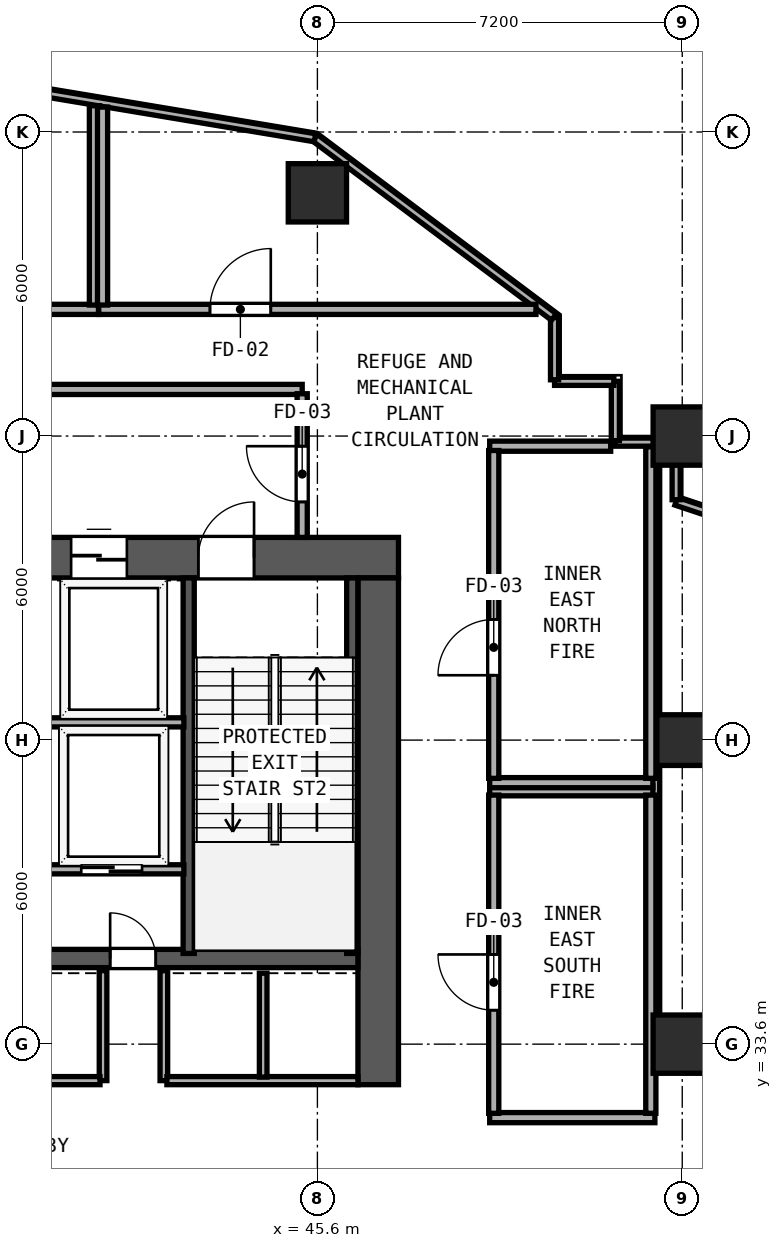
"""IFC4 building model, lengths in metres.
Left out: names, types, materials, properties, quantities, classifications, styles, units other than length and angle.
Written with IfcOpenShell. Run it as: python <this file> out.ifc"""

import sys

from ifc_helpers import new_model, si_unit, direction, frame, frame_2d, origin, origin_2d, place, context, subcontext, project, spatial, rectangle, hollow_rectangle, extrude, element, fill, save


model = new_model("IFC4")
c1 = context("Model", 3, precision=1e-05, world=origin(), true_north=direction((0.0, 1.0)))
c2 = subcontext(c1, "Body", "Model", "MODEL_VIEW")
j1 = project(units=[si_unit("LENGTHUNIT", "METRE"), si_unit("PLANEANGLEUNIT", "RADIAN")], contexts=[c1])
p1 = place(None, origin())
s1 = spatial("IfcSite", under=j1, at=p1, CompositionType="ELEMENT")
p2 = place(p1, origin())
s2 = spatial("IfcBuilding", under=s1, at=p2, CompositionType="ELEMENT")
p3 = place(p2, frame((0.0, 0.0, 89.4)))
s3 = spatial("IfcBuildingStorey", under=s2, at=p3, CompositionType="ELEMENT", Elevation=89.4)
p4 = place(p3, frame((29.6, 43.2, 0.0), z_axis=(0.0, 0.0, 1.0), x_axis=(1.0, 0.0, 0.0)))
e1 = element("IfcWall", 1, at=p4, inside=s3, PredefinedType="SHEAR", context=c2, shape_type="SweptSolid", body=[
    extrude(rectangle(XDim=17.6, YDim=0.8, at=frame_2d((8.8, 0.0))), origin(), (0.0, 0.0, 1.0), 4.35),
])
p5 = place(p4, frame((2.45, 0.0, 0.0)))
e2 = element("IfcOpeningElement", 2, at=p5, cuts=e1, PredefinedType="OPENING", context=c2, shape_type="SweptSolid", body=[
    extrude(rectangle(XDim=1.1, YDim=2.15, at=frame_2d((0.55, 1.075))), frame((0.0, 0.41, 0.0), z_axis=(0.0, -1.0, 0.0), x_axis=(1.0, 0.0, 0.0)), (0.0, 0.0, 1.0), 0.82),
])
p6 = place(p4, frame((7.56, 0.0, 0.0)))
e3 = element("IfcOpeningElement", 3, at=p6, cuts=e1, PredefinedType="OPENING", context=c2, shape_type="SweptSolid", body=[
    extrude(rectangle(XDim=1.1, YDim=2.15, at=frame_2d((0.55, 1.075))), frame((0.0, 0.41, 0.0), z_axis=(0.0, -1.0, 0.0), x_axis=(1.0, 0.0, 0.0)), (0.0, 0.0, 1.0), 0.82),
])
p7 = place(p4, frame((13.65, 0.0, 0.0)))
e4 = element("IfcOpeningElement", 4, at=p7, cuts=e1, PredefinedType="OPENING", context=c2, shape_type="SweptSolid", body=[
    extrude(rectangle(XDim=1.1, YDim=2.15, at=frame_2d((0.55, 1.075))), frame((0.0, 0.41, 0.0), z_axis=(0.0, -1.0, 0.0), x_axis=(1.0, 0.0, 0.0)), (0.0, 0.0, 1.0), 0.82),
])
p8 = place(p4, frame((4.78, 0.0, 0.0)))
e5 = element("IfcOpeningElement", 5, at=p8, cuts=e1, PredefinedType="OPENING", context=c2, shape_type="SweptSolid", body=[
    extrude(rectangle(XDim=1.1, YDim=2.2, at=frame_2d((0.55, 1.1))), frame((0.0, 0.41, 0.0), z_axis=(0.0, -1.0, 0.0), x_axis=(1.0, 0.0, 0.0)), (0.0, 0.0, 1.0), 0.82),
])
p9 = place(p4, frame((11.14, 0.0, 0.0)))
e6 = element("IfcOpeningElement", 6, at=p9, cuts=e1, PredefinedType="OPENING", context=c2, shape_type="SweptSolid", body=[
    extrude(rectangle(XDim=1.1, YDim=2.2, at=frame_2d((0.55, 1.1))), frame((0.0, 0.41, 0.0), z_axis=(0.0, -1.0, 0.0), x_axis=(1.0, 0.0, 0.0)), (0.0, 0.0, 1.0), 0.82),
])
p10 = place(p3, frame((46.8, 32.8, 0.0), z_axis=(0.0, 0.0, 1.0), x_axis=(0.0, 1.0, 0.0)))
e7 = element("IfcWall", 7, at=p10, inside=s3, PredefinedType="SHEAR", context=c2, shape_type="SweptSolid", body=[
    extrude(rectangle(XDim=10.0, YDim=0.8, at=frame_2d((5.0, 0.0))), origin(), (0.0, 0.0, 1.0), 4.35),
])
p11 = place(p3, frame((30.4, 35.29, 0.0), z_axis=(0.0, 0.0, 1.0), x_axis=(1.0, 0.0, 0.0)))
e8 = element("IfcWall", 8, at=p11, inside=s3, PredefinedType="SHEAR", context=c2, shape_type="SweptSolid", body=[
    extrude(rectangle(XDim=16.0, YDim=0.36, at=frame_2d((8.0, 0.0))), origin(), (0.0, 0.0, 1.0), 4.35),
])
p12 = place(p11, frame((4.95, 0.0, 0.0), z_axis=(0.0, 0.0, 1.0), x_axis=(-1.0, 0.0, 0.0)))
e9 = element("IfcOpeningElement", 9, at=p12, cuts=e8, PredefinedType="OPENING", context=c2, shape_type="SweptSolid", body=[
    extrude(rectangle(XDim=0.9, YDim=2.1, at=frame_2d((0.45, 1.05))), frame((0.0, 0.19, 0.0), z_axis=(0.0, -1.0, 0.0), x_axis=(1.0, 0.0, 0.0)), (0.0, 0.0, 1.0), 0.38),
])
p13 = place(p11, frame((12.01, 0.0, 0.0), z_axis=(0.0, 0.0, 1.0), x_axis=(-1.0, 0.0, 0.0)))
e10 = element("IfcOpeningElement", 10, at=p13, cuts=e8, PredefinedType="OPENING", context=c2, shape_type="SweptSolid", body=[
    extrude(rectangle(XDim=0.9, YDim=2.1, at=frame_2d((0.45, 1.05))), frame((0.0, 0.19, 0.0), z_axis=(0.0, -1.0, 0.0), x_axis=(1.0, 0.0, 0.0)), (0.0, 0.0, 1.0), 0.38),
])
for number, where, z_axis, x_axis in (
    (11, (43.06, 35.39, 0.0), (0.0, 0.0, 1.0), (0.0, 1.0, 0.0)),
    (12, (46.288, 35.39, 0.0), (0.0, 0.0, 1.0), (0.0, 1.0, 0.0)),
):
    element("IfcWall", number, at=place(p3, frame(where, z_axis=z_axis, x_axis=x_axis)), inside=s3, PredefinedType="SHEAR", context=c2, shape_type="SweptSolid", body=[
        extrude(rectangle(XDim=7.41, YDim=0.22, at=frame_2d((3.705, 0.0))), origin(), (0.0, 0.0, 1.0), 4.35),
    ])
for number, where, z_axis, x_axis in (
    (13, (52.8, 33.6, 0.0), (0.0, 0.0, 1.0), (1.0, 0.0, 0.0)),
    (14, (52.8, 45.6, 0.0), (0.0, 0.0, 1.0), (1.0, 0.0, 0.0)),
    (15, (45.6, 50.4, 0.0), (0.0, 0.0, 1.0), (1.0, 0.0, 0.0)),
):
    element("IfcColumn", number, at=place(p3, frame(where, z_axis=z_axis, x_axis=x_axis)), inside=s3, PredefinedType="COLUMN", context=c2, shape_type="SweptSolid", body=[
        extrude(hollow_rectangle(XDim=1.15, YDim=1.15, WallThickness=0.042, at=origin_2d()), origin(), (0.0, 0.0, 1.0), 4.6),
    ])
p14 = place(p3, frame((52.8, 39.6, 0.0), z_axis=(0.0, 0.0, 1.0), x_axis=(1.0, 0.0, 0.0)))
e16 = element("IfcColumn", 16, at=p14, inside=s3, PredefinedType="COLUMN", context=c2, shape_type="SweptSolid", body=[
    extrude(hollow_rectangle(XDim=1.0, YDim=1.0, WallThickness=0.038, at=origin_2d()), origin(), (0.0, 0.0, 1.0), 4.6),
])
p15 = place(p3, frame((58.145, 42.492, 0.0), z_axis=(0.0, 0.0, 1.0), x_axis=(-0.948683298051, 0.316227766017, 0.0)))
e17 = element("IfcWall", 17, at=p15, inside=s3, PredefinedType="PARAPET", context=c2, shape_type="SweptSolid", body=[
    extrude(rectangle(XDim=5.76, YDim=0.16, at=frame_2d((2.88, 0.0))), origin(), (0.0, 0.0, 1.0), 1.15),
])
p16 = place(p3, frame((52.68, 44.344, 0.0), z_axis=(0.0, 0.0, 1.0), x_axis=(0.0, 1.0, 0.0)))
e18 = element("IfcWall", 18, at=p16, inside=s3, PredefinedType="PARAPET", context=c2, shape_type="SweptSolid", body=[
    extrude(rectangle(XDim=0.689, YDim=0.16, at=frame_2d((0.345, 0.0))), origin(), (0.0, 0.0, 1.0), 1.15),
])
p17 = place(p3, frame((52.233, 45.48, 0.0), z_axis=(0.0, 0.0, 1.0), x_axis=(-1.0, 0.0, 0.0)))
e19 = element("IfcWall", 19, at=p17, inside=s3, PredefinedType="PARAPET", context=c2, shape_type="SweptSolid", body=[
    extrude(rectangle(XDim=0.753, YDim=0.16, at=frame_2d((0.376, 0.0))), origin(), (0.0, 0.0, 1.0), 1.15),
])
for number, where, z_axis, x_axis in (
    (20, (51.48, 45.51, 0.0), (0.0, 0.0, 1.0), (0.0, 1.0, 0.0)),
    (21, (51.45, 46.68, 0.0), (0.0, 0.0, 1.0), (-1.0, 0.0, 0.0)),
):
    element("IfcWall", number, at=place(p3, frame(where, z_axis=z_axis, x_axis=x_axis)), inside=s3, PredefinedType="PARAPET", context=c2, shape_type="SweptSolid", body=[
        extrude(rectangle(XDim=1.17, YDim=0.16, at=frame_2d((0.585, 0.0))), origin(), (0.0, 0.0, 1.0), 1.15),
    ])
p18 = place(p3, frame((50.28, 46.71, 0.0), z_axis=(0.0, 0.0, 1.0), x_axis=(0.0, 1.0, 0.0)))
e22 = element("IfcWall", 22, at=p18, inside=s3, PredefinedType="PARAPET", context=c2, shape_type="SweptSolid", body=[
    extrude(rectangle(XDim=1.23, YDim=0.16, at=frame_2d((0.615, 0.0))), origin(), (0.0, 0.0, 1.0), 1.15),
])
p19 = place(p3, frame((50.268, 47.949, 0.0), z_axis=(0.0, 0.0, 1.0), x_axis=(-0.800004969205, 0.599993374337, 0.0)))
e23 = element("IfcWall", 23, at=p19, inside=s3, PredefinedType="PARAPET", context=c2, shape_type="SweptSolid", body=[
    extrude(rectangle(XDim=5.896, YDim=0.16, at=frame_2d((2.948, 0.0))), origin(), (0.0, 0.0, 1.0), 1.15),
])
p20 = place(p3, frame((45.552, 51.486, 0.0), z_axis=(0.0, 0.0, 1.0), x_axis=(-0.986394833909, 0.164393526752, 0.0)))
e24 = element("IfcWall", 24, at=p20, inside=s3, PredefinedType="PARAPET", context=c2, shape_type="SweptSolid", body=[
    extrude(rectangle(XDim=7.25, YDim=0.16, at=frame_2d((3.625, 0.0))), origin(), (0.0, 0.0, 1.0), 1.15),
])
p21 = place(p3, frame((31.5, 46.52, 0.0), z_axis=(0.0, 0.0, 1.0), x_axis=(1.0, 0.0, 0.0)))
e25 = element("IfcWall", 25, at=p21, inside=s3, PredefinedType="SOLIDWALL", context=c2, shape_type="SweptSolid", body=[
    extrude(rectangle(XDim=13.8, YDim=0.2, at=frame_2d((6.9, 0.0))), origin(), (0.0, 0.0, 1.0), 4.35),
])
p22 = place(p3, frame((45.3, 43.6, 0.0), z_axis=(0.0, 0.0, 1.0), x_axis=(0.0, 1.0, 0.0)))
e26 = element("IfcWall", 26, at=p22, inside=s3, PredefinedType="SOLIDWALL", context=c2, shape_type="SweptSolid", body=[
    extrude(rectangle(XDim=2.835, YDim=0.2, at=frame_2d((1.417, 0.0))), origin(), (0.0, 0.0, 1.0), 4.35),
])
p23 = place(p22, frame((0.7, 0.0, 0.0)))
e27 = element("IfcOpeningElement", 27, at=p23, cuts=e26, PredefinedType="OPENING", context=c2, shape_type="SweptSolid", body=[
    extrude(rectangle(XDim=1.1, YDim=2.15, at=frame_2d((0.55, 1.075))), frame((0.0, 0.11, 0.0), z_axis=(0.0, -1.0, 0.0), x_axis=(1.0, 0.0, 0.0)), (0.0, 0.0, 1.0), 0.22),
])
p24 = place(p3, frame((40.195, 39.95, 0.0), z_axis=(0.0, 0.0, 1.0), x_axis=(1.0, 0.0, 0.0)))
e28 = element("IfcWall", 28, at=p24, inside=s3, PredefinedType="SOLIDWALL", context=c2, shape_type="SweptSolid", body=[
    extrude(rectangle(XDim=2.77, YDim=0.18, at=frame_2d((1.385, 0.0))), origin(), (0.0, 0.0, 1.0), 4.35),
])
p25 = place(p3, frame((40.195, 37.05, 0.0), z_axis=(0.0, 0.0, 1.0), x_axis=(1.0, 0.0, 0.0)))
e29 = element("IfcWall", 29, at=p25, inside=s3, PredefinedType="SOLIDWALL", context=c2, shape_type="SweptSolid", body=[
    extrude(rectangle(XDim=2.77, YDim=0.18, at=frame_2d((1.385, 0.0))), origin(), (0.0, 0.0, 1.0), 4.35),
])
p26 = place(p25, frame((1.945, 0.0, 0.0), z_axis=(0.0, 0.0, 1.0), x_axis=(-1.0, 0.0, 0.0)))
e30 = element("IfcOpeningElement", 30, at=p26, cuts=e29, PredefinedType="OPENING", context=c2, shape_type="SweptSolid", body=[
    extrude(rectangle(XDim=1.2, YDim=2.2, at=frame_2d((0.6, 1.1))), frame((0.0, 0.1, 0.0), z_axis=(0.0, -1.0, 0.0), x_axis=(1.0, 0.0, 0.0)), (0.0, 0.0, 1.0), 0.2),
])
for number, where, z_axis, x_axis in (
    (31, (41.37, 32.88, 0.0), (0.0, 0.0, 1.0), (0.0, 1.0, 0.0)),
    (32, (42.57, 32.88, 0.0), (0.0, 0.0, 1.0), (0.0, 1.0, 0.0)),
):
    element("IfcWall", number, at=place(p3, frame(where, z_axis=z_axis, x_axis=x_axis)), inside=s3, PredefinedType="SOLIDWALL", context=c2, shape_type="SweptSolid", body=[
        extrude(rectangle(XDim=2.17, YDim=0.15, at=frame_2d((1.085, 0.0))), origin(), (0.0, 0.0, 1.0), 4.35),
    ])
p27 = place(p3, frame((35.57, 32.88, 0.0), z_axis=(0.0, 0.0, 1.0), x_axis=(1.0, 0.0, 0.0)))
e33 = element("IfcWall", 33, at=p27, inside=s3, PredefinedType="SOLIDWALL", context=c2, shape_type="SweptSolid", body=[
    extrude(rectangle(XDim=5.74, YDim=0.16, at=frame_2d((2.87, 0.0))), origin(), (0.0, 0.0, 1.0), 4.35),
])
p28 = place(p27, frame((1.47, 0.0, 0.0), z_axis=(0.0, 0.0, 1.0), x_axis=(-1.0, 0.0, 0.0)))
e34 = element("IfcOpeningElement", 34, at=p28, cuts=e33, PredefinedType="OPENING", context=c2, shape_type="SweptSolid", body=[
    extrude(rectangle(XDim=1.1, YDim=2.2, at=frame_2d((0.55, 1.1))), frame((0.0, 0.09, 0.0), z_axis=(0.0, -1.0, 0.0), x_axis=(1.0, 0.0, 0.0)), (0.0, 0.0, 1.0), 0.18),
])
p29 = place(p27, frame((3.46, 0.0, 0.0), z_axis=(0.0, 0.0, 1.0), x_axis=(-1.0, 0.0, 0.0)))
e35 = element("IfcOpeningElement", 35, at=p29, cuts=e33, PredefinedType="OPENING", context=c2, shape_type="SweptSolid", body=[
    extrude(rectangle(XDim=1.1, YDim=2.2, at=frame_2d((0.55, 1.1))), frame((0.0, 0.09, 0.0), z_axis=(0.0, -1.0, 0.0), x_axis=(1.0, 0.0, 0.0)), (0.0, 0.0, 1.0), 0.18),
])
p30 = place(p3, frame((42.63, 32.88, 0.0), z_axis=(0.0, 0.0, 1.0), x_axis=(1.0, 0.0, 0.0)))
e36 = element("IfcWall", 36, at=p30, inside=s3, PredefinedType="SOLIDWALL", context=c2, shape_type="SweptSolid", body=[
    extrude(rectangle(XDim=3.77, YDim=0.16, at=frame_2d((1.885, 0.0))), origin(), (0.0, 0.0, 1.0), 4.35),
])
p31 = place(p3, frame((44.53, 32.95, 0.0), z_axis=(0.0, 0.0, 1.0), x_axis=(0.0, 1.0, 0.0)))
e37 = element("IfcWall", 37, at=p31, inside=s3, PredefinedType="SOLIDWALL", context=c2, shape_type="SweptSolid", body=[
    extrude(rectangle(XDim=2.05, YDim=0.15, at=frame_2d((1.025, 0.0))), origin(), (0.0, 0.0, 1.0), 4.35),
])
p32 = place(p3, frame((52.28, 33.6, 0.0), z_axis=(0.0, 0.0, 1.0), x_axis=(0.0, 1.0, 0.0)))
e38 = element("IfcWall", 38, at=p32, inside=s3, PredefinedType="PARTITIONING", context=c2, shape_type="SweptSolid", body=[
    extrude(rectangle(XDim=11.788, YDim=0.15, at=frame_2d((5.894, 0.0))), origin(), (0.0, 0.0, 1.0), 4.35),
])
p33 = place(p3, frame((49.0, 38.6, 0.0), z_axis=(0.0, 0.0, 1.0), x_axis=(1.0, 0.0, 0.0)))
e39 = element("IfcWall", 39, at=p33, inside=s3, PredefinedType="SOLIDWALL", context=c2, shape_type="SweptSolid", body=[
    extrude(rectangle(XDim=3.22, YDim=0.2, at=frame_2d((1.61, 0.0))), origin(), (0.0, 0.0, 1.0), 4.35),
])
p34 = place(p3, frame((49.0, 32.15, 0.0), z_axis=(0.0, 0.0, 1.0), x_axis=(1.0, 0.0, 0.0)))
e40 = element("IfcWall", 40, at=p34, inside=s3, PredefinedType="SOLIDWALL", context=c2, shape_type="SweptSolid", body=[
    extrude(rectangle(XDim=3.26, YDim=0.2, at=frame_2d((1.63, 0.0))), origin(), (0.0, 0.0, 1.0), 4.35),
])
p35 = place(p3, frame((49.08, 32.235, 0.0), z_axis=(0.0, 0.0, 1.0), x_axis=(0.0, 1.0, 0.0)))
e41 = element("IfcWall", 41, at=p35, inside=s3, PredefinedType="SOLIDWALL", context=c2, shape_type="SweptSolid", body=[
    extrude(rectangle(XDim=6.28, YDim=0.2, at=frame_2d((3.14, 0.0))), origin(), (0.0, 0.0, 1.0), 4.35),
])
p36 = place(p35, frame((2.035, 0.0, 0.0)))
e42 = element("IfcOpeningElement", 42, at=p36, cuts=e41, PredefinedType="OPENING", context=c2, shape_type="SweptSolid", body=[
    extrude(rectangle(XDim=1.1, YDim=2.15, at=frame_2d((0.55, 1.075))), frame((0.0, 0.11, 0.0), z_axis=(0.0, -1.0, 0.0), x_axis=(1.0, 0.0, 0.0)), (0.0, 0.0, 1.0), 0.22),
])
p37 = place(p3, frame((52.18, 32.235, 0.0), z_axis=(0.0, 0.0, 1.0), x_axis=(0.0, 1.0, 0.0)))
e43 = element("IfcWall", 43, at=p37, inside=s3, PredefinedType="SOLIDWALL", context=c2, shape_type="SweptSolid", body=[
    extrude(rectangle(XDim=6.28, YDim=0.2, at=frame_2d((3.14, 0.0))), origin(), (0.0, 0.0, 1.0), 4.35),
])
p38 = place(p3, frame((49.0, 45.4, 0.0), z_axis=(0.0, 0.0, 1.0), x_axis=(1.0, 0.0, 0.0)))
e44 = element("IfcWall", 44, at=p38, inside=s3, PredefinedType="SOLIDWALL", context=c2, shape_type="SweptSolid", body=[
    extrude(rectangle(XDim=2.388, YDim=0.2, at=frame_2d((1.194, 0.0))), origin(), (0.0, 0.0, 1.0), 4.35),
])
p39 = place(p3, frame((49.0, 38.76, 0.0), z_axis=(0.0, 0.0, 1.0), x_axis=(1.0, 0.0, 0.0)))
e45 = element("IfcWall", 45, at=p39, inside=s3, PredefinedType="SOLIDWALL", context=c2, shape_type="SweptSolid", body=[
    extrude(rectangle(XDim=3.22, YDim=0.2, at=frame_2d((1.61, 0.0))), origin(), (0.0, 0.0, 1.0), 4.35),
])
p40 = place(p3, frame((49.08, 38.845, 0.0), z_axis=(0.0, 0.0, 1.0), x_axis=(0.0, 1.0, 0.0)))
e46 = element("IfcWall", 46, at=p40, inside=s3, PredefinedType="SOLIDWALL", context=c2, shape_type="SweptSolid", body=[
    extrude(rectangle(XDim=6.47, YDim=0.2, at=frame_2d((3.235, 0.0))), origin(), (0.0, 0.0, 1.0), 4.35),
])
p41 = place(p40, frame((2.035, 0.0, 0.0)))
e47 = element("IfcOpeningElement", 47, at=p41, cuts=e46, PredefinedType="OPENING", context=c2, shape_type="SweptSolid", body=[
    extrude(rectangle(XDim=1.1, YDim=2.15, at=frame_2d((0.55, 1.075))), frame((0.0, 0.11, 0.0), z_axis=(0.0, -1.0, 0.0), x_axis=(1.0, 0.0, 0.0)), (0.0, 0.0, 1.0), 0.22),
])
p42 = place(p3, frame((52.18, 38.845, 0.0), z_axis=(0.0, 0.0, 1.0), x_axis=(0.0, 1.0, 0.0)))
e48 = element("IfcWall", 48, at=p42, inside=s3, PredefinedType="SOLIDWALL", context=c2, shape_type="SweptSolid", body=[
    extrude(rectangle(XDim=6.543, YDim=0.2, at=frame_2d((3.271, 0.0))), origin(), (0.0, 0.0, 1.0), 4.35),
])
p43 = place(p3, frame((26.887, 48.1, 0.0), z_axis=(0.0, 0.0, 1.0), x_axis=(1.0, 0.0, 0.0)))
e49 = element("IfcWall", 49, at=p43, inside=s3, PredefinedType="SOLIDWALL", context=c2, shape_type="SweptSolid", body=[
    extrude(rectangle(XDim=14.393, YDim=0.2, at=frame_2d((7.197, 0.0))), origin(), (0.0, 0.0, 1.0), 4.35),
])
p44 = place(p43, frame((4.063, 0.0, 0.0)))
e50 = element("IfcOpeningElement", 50, at=p44, cuts=e49, PredefinedType="OPENING", context=c2, shape_type="SweptSolid", body=[
    extrude(rectangle(XDim=1.2, YDim=2.15, at=frame_2d((0.6, 1.075))), frame((0.0, 0.11, 0.0), z_axis=(0.0, -1.0, 0.0), x_axis=(1.0, 0.0, 0.0)), (0.0, 0.0, 1.0), 0.22),
])
p45 = place(p3, frame((41.2, 48.185, 0.0), z_axis=(0.0, 0.0, 1.0), x_axis=(0.0, 1.0, 0.0)))
e51 = element("IfcWall", 51, at=p45, inside=s3, PredefinedType="SOLIDWALL", context=c2, shape_type="SweptSolid", body=[
    extrude(rectangle(XDim=3.933, YDim=0.2, at=frame_2d((1.967, 0.0))), origin(), (0.0, 0.0, 1.0), 4.35),
])
p46 = place(p3, frame((41.285, 48.1, 0.0), z_axis=(0.0, 0.0, 1.0), x_axis=(1.0, 0.0, 0.0)))
e52 = element("IfcWall", 52, at=p46, inside=s3, PredefinedType="SOLIDWALL", context=c2, shape_type="SweptSolid", body=[
    extrude(rectangle(XDim=8.628, YDim=0.2, at=frame_2d((4.314, 0.0))), origin(), (0.0, 0.0, 1.0), 4.35),
])
p47 = place(p46, frame((2.195, 0.0, 0.0)))
e53 = element("IfcOpeningElement", 53, at=p47, cuts=e52, PredefinedType="OPENING", context=c2, shape_type="SweptSolid", body=[
    extrude(rectangle(XDim=1.2, YDim=2.15, at=frame_2d((0.6, 1.075))), frame((0.0, 0.11, 0.0), z_axis=(0.0, -1.0, 0.0), x_axis=(1.0, 0.0, 0.0)), (0.0, 0.0, 1.0), 0.22),
])
p48 = place(p3, frame((41.36, 48.185, 0.0), z_axis=(0.0, 0.0, 1.0), x_axis=(0.0, 1.0, 0.0)))
e54 = element("IfcWall", 54, at=p48, inside=s3, PredefinedType="SOLIDWALL", context=c2, shape_type="SweptSolid", body=[
    extrude(rectangle(XDim=3.907, YDim=0.2, at=frame_2d((1.953, 0.0))), origin(), (0.0, 0.0, 1.0), 4.35),
])
p49 = place(p7, origin())
e55 = element("IfcDoor", 55, at=p49, inside=s3, OperationType="SINGLE_SWING_RIGHT", PredefinedType="DOOR", context=c2, shape_type="SweptSolid", body=[
    extrude(rectangle(XDim=1.1, YDim=2.15, at=frame_2d((0.55, 1.075))), frame((0.0, 0.185, 0.0), z_axis=(0.0, -1.0, 0.0), x_axis=(1.0, 0.0, 0.0)), (0.0, 0.0, 1.0), 0.05),
])
fill(e4, e55)
p50 = place(p23, origin())
e56 = element("IfcDoor", 56, at=p50, inside=s3, OperationType="SINGLE_SWING_RIGHT", PredefinedType="DOOR", context=c2, shape_type="SweptSolid", body=[
    extrude(rectangle(XDim=1.1, YDim=2.15, at=frame_2d((0.55, 1.075))), frame((0.0, 0.025, 0.0), z_axis=(0.0, -1.0, 0.0), x_axis=(1.0, 0.0, 0.0)), (0.0, 0.0, 1.0), 0.05),
])
fill(e27, e56)
p51 = place(p9, origin())
e57 = element("IfcDoor", 57, at=p51, inside=s3, OperationType="SLIDING_TO_LEFT", PredefinedType="DOOR", context=c2, shape_type="SweptSolid", body=[
    extrude(rectangle(XDim=1.1, YDim=2.2, at=frame_2d((0.55, 1.1))), frame((0.0, 0.185, 0.0), z_axis=(0.0, -1.0, 0.0), x_axis=(1.0, 0.0, 0.0)), (0.0, 0.0, 1.0), 0.05),
])
fill(e6, e57)
p52 = place(p26, origin())
e58 = element("IfcDoor", 58, at=p52, inside=s3, OperationType="SLIDING_TO_RIGHT", PredefinedType="DOOR", context=c2, shape_type="SweptSolid", body=[
    extrude(rectangle(XDim=1.2, YDim=2.2, at=frame_2d((0.6, 1.1))), frame((0.0, 0.025, 0.0), z_axis=(0.0, -1.0, 0.0), x_axis=(1.0, 0.0, 0.0)), (0.0, 0.0, 1.0), 0.05),
])
fill(e30, e58)
p53 = place(p13, origin())
e59 = element("IfcDoor", 59, at=p53, inside=s3, OperationType="SINGLE_SWING_RIGHT", PredefinedType="DOOR", context=c2, shape_type="SweptSolid", body=[
    extrude(rectangle(XDim=0.9, YDim=2.1, at=frame_2d((0.45, 1.05))), frame((0.0, 0.025, 0.0), z_axis=(0.0, -1.0, 0.0), x_axis=(1.0, 0.0, 0.0)), (0.0, 0.0, 1.0), 0.05),
])
fill(e10, e59)
p54 = place(p36, origin())
e60 = element("IfcDoor", 60, at=p54, inside=s3, OperationType="SINGLE_SWING_RIGHT", PredefinedType="DOOR", context=c2, shape_type="SweptSolid", body=[
    extrude(rectangle(XDim=1.1, YDim=2.15, at=frame_2d((0.55, 1.075))), frame((0.0, 0.025, 0.0), z_axis=(0.0, -1.0, 0.0), x_axis=(1.0, 0.0, 0.0)), (0.0, 0.0, 1.0), 0.05),
])
fill(e42, e60)
p55 = place(p41, origin())
e61 = element("IfcDoor", 61, at=p55, inside=s3, OperationType="SINGLE_SWING_LEFT", PredefinedType="DOOR", context=c2, shape_type="SweptSolid", body=[
    extrude(rectangle(XDim=1.1, YDim=2.15, at=frame_2d((0.55, 1.075))), frame((0.0, 0.025, 0.0), z_axis=(0.0, -1.0, 0.0), x_axis=(1.0, 0.0, 0.0)), (0.0, 0.0, 1.0), 0.05),
])
fill(e47, e61)
p56 = place(p47, origin())
e62 = element("IfcDoor", 62, at=p56, inside=s3, OperationType="SINGLE_SWING_RIGHT", PredefinedType="DOOR", context=c2, shape_type="SweptSolid", body=[
    extrude(rectangle(XDim=1.2, YDim=2.15, at=frame_2d((0.6, 1.075))), frame((0.0, 0.025, 0.0), z_axis=(0.0, -1.0, 0.0), x_axis=(1.0, 0.0, 0.0)), (0.0, 0.0, 1.0), 0.05),
])
fill(e53, e62)
save(model, sys.argv[1])
